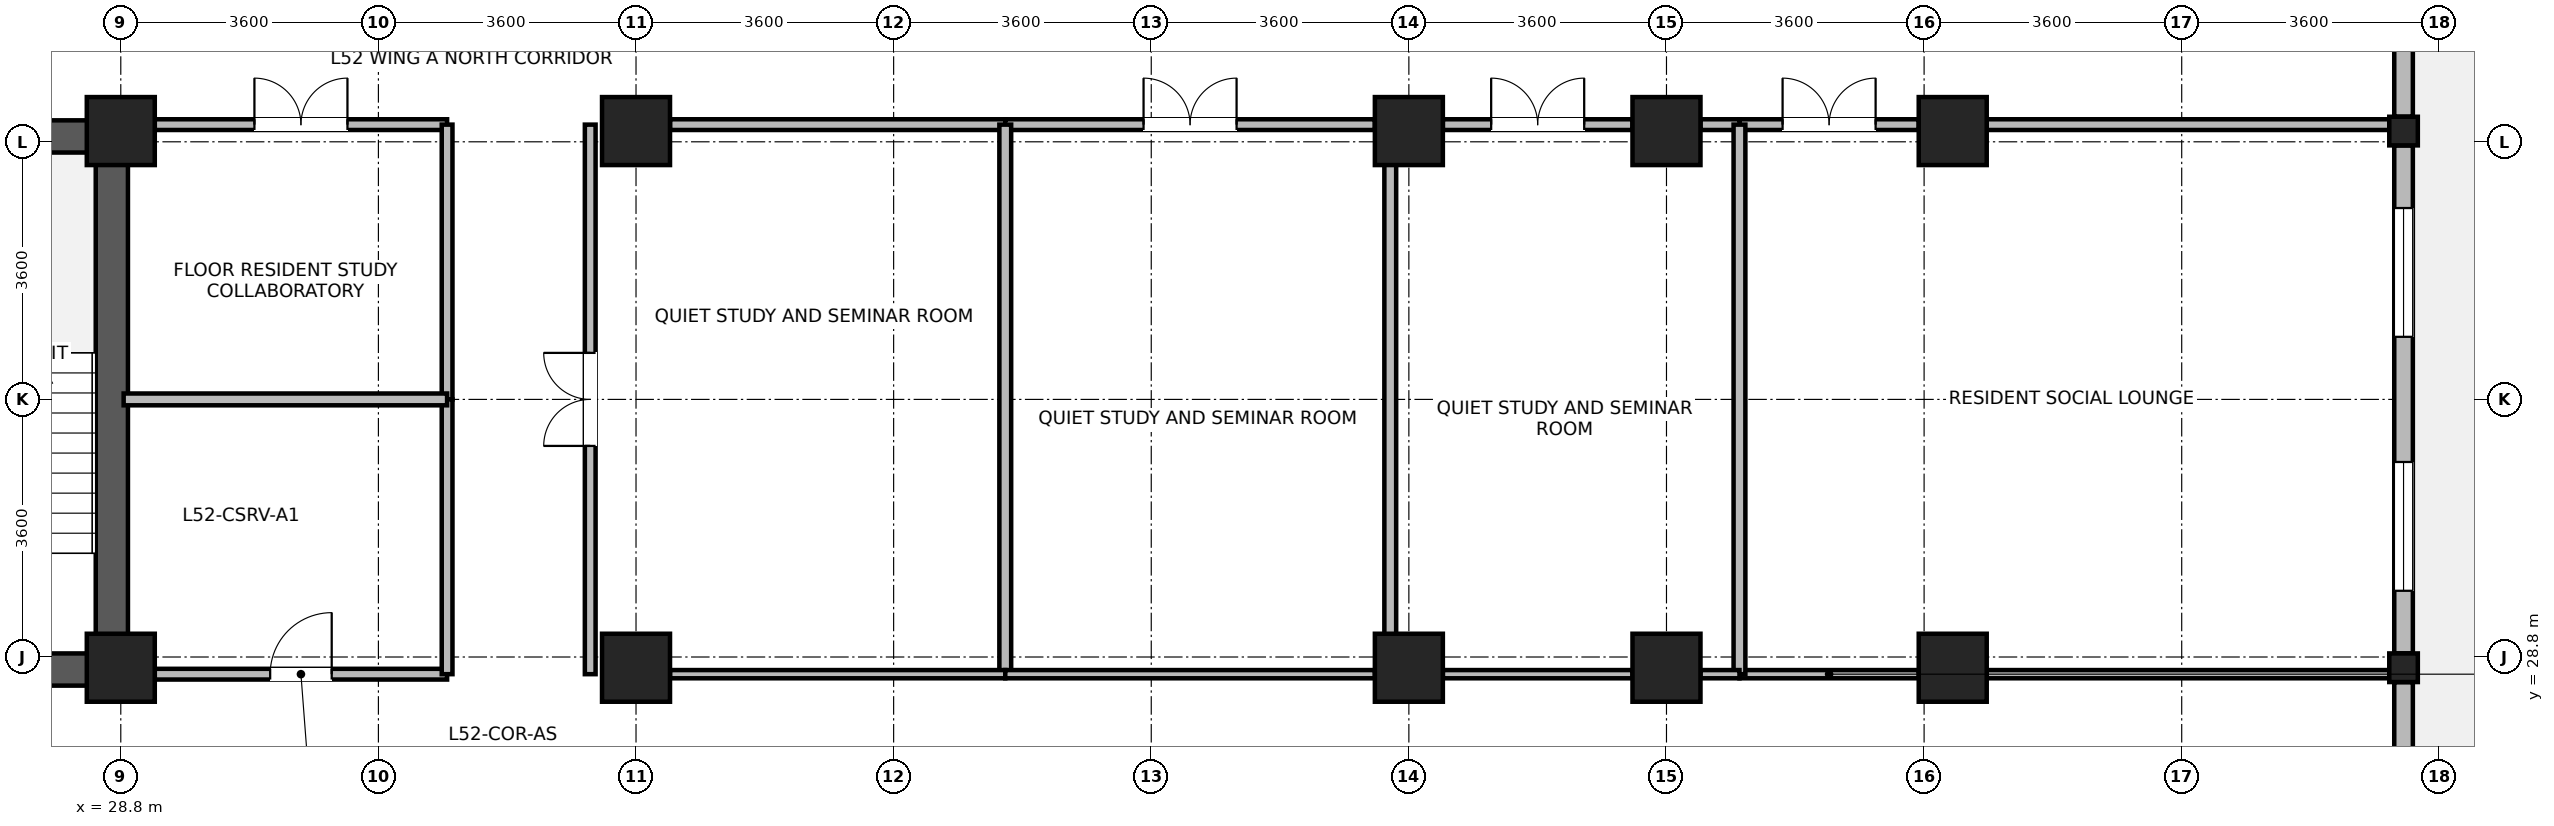
"""IFC4 building model, lengths in metres.
Left out: names, types, materials, properties, quantities, classifications, styles, units other than length and angle.
Written with IfcOpenShell. Run it as: python <this file> out.ifc"""

import sys

from ifc_helpers import new_model, si_unit, direction, frame, frame_2d, origin, origin_2d, place, context, subcontext, project, spatial, rectangle, i_section, extrude, source, transform, mapped, element, fill, save


model = new_model("IFC4")
c1 = context("Model", 3, precision=1e-05, world=origin(), true_north=direction((0.0, 1.0)))
c2 = subcontext(c1, "Body", "Model", "MODEL_VIEW")
j1 = project(units=[si_unit("LENGTHUNIT", "METRE"), si_unit("PLANEANGLEUNIT", "RADIAN")], contexts=[c1])
p1 = place(None, origin())
s1 = spatial("IfcSite", under=j1, at=p1, CompositionType="ELEMENT")
p2 = place(p1, origin())
s2 = spatial("IfcBuilding", under=s1, at=p2, CompositionType="ELEMENT")
p3 = place(p2, frame((0.0, 0.0, 205.5)))
s3 = spatial("IfcBuildingStorey", under=s2, at=p3, CompositionType="ELEMENT", Elevation=205.5)
p4 = place(p3, frame((28.675, 28.4, 0.0), z_axis=(0.0, 0.0, 1.0), x_axis=(0.0, 1.0, 0.0)))
e1 = element("IfcWall", 1, at=p4, inside=s3, PredefinedType="SHEAR", context=c2, shape_type="SweptSolid", body=[
    extrude(rectangle(XDim=7.9, YDim=0.45, at=frame_2d((3.95, 0.0))), origin(), (0.0, 0.0, 1.0), 3.47),
])
for number, where, z_axis, x_axis in (
    (2, (25.25, 28.625, 0.0), (0.0, 0.0, 1.0), (1.0, 0.0, 0.0)),
    (3, (25.25, 36.075, 0.0), (0.0, 0.0, 1.0), (1.0, 0.0, 0.0)),
):
    element("IfcWall", number, at=place(p3, frame(where, z_axis=z_axis, x_axis=x_axis)), inside=s3, PredefinedType="SHEAR", context=c2, shape_type="SweptSolid", body=[
        extrude(rectangle(XDim=3.2, YDim=0.45, at=frame_2d((1.6, 0.0))), origin(), (0.0, 0.0, 1.0), 3.47),
    ])
m1 = source(origin(), c2, "Body", "SweptSolid", [
    extrude(rectangle(XDim=0.95, YDim=0.95, at=origin_2d()), origin(), (0.0, 0.0, 1.0), 3.7),
])
for number, where, z_axis, x_axis in (
    (4, (28.8, 28.65, 0.0), (0.0, 0.0, 1.0), (1.0, 0.0, 0.0)),
    (5, (28.8, 36.15, 0.0), (0.0, 0.0, 1.0), (1.0, 0.0, 0.0)),
    (6, (36.0, 28.65, 0.0), (0.0, 0.0, 1.0), (1.0, 0.0, 0.0)),
    (7, (36.0, 36.15, 0.0), (0.0, 0.0, 1.0), (1.0, 0.0, 0.0)),
    (8, (46.8, 28.65, 0.0), (0.0, 0.0, 1.0), (1.0, 0.0, 0.0)),
    (9, (46.8, 36.15, 0.0), (0.0, 0.0, 1.0), (1.0, 0.0, 0.0)),
    (10, (50.4, 28.65, 0.0), (0.0, 0.0, 1.0), (1.0, 0.0, 0.0)),
    (11, (50.4, 36.15, 0.0), (0.0, 0.0, 1.0), (1.0, 0.0, 0.0)),
    (12, (54.4, 28.65, 0.0), (0.0, 0.0, 1.0), (1.0, 0.0, 0.0)),
    (13, (54.4, 36.15, 0.0), (0.0, 0.0, 1.0), (1.0, 0.0, 0.0)),
):
    element("IfcColumn", number, at=place(p3, frame(where, z_axis=z_axis, x_axis=x_axis)), inside=s3, PredefinedType="COLUMN", context=c2, shape_type="MappedRepresentation", body=[
        mapped(m1, transform((0.0, 0.0, 0.0), x_axis=(1.0, 0.0, 0.0), y_axis=(0.0, 1.0, 0.0), z_axis=(0.0, 0.0, 1.0), scale=1.0)),
    ])
m2 = source(origin(), c2, "Body", "SweptSolid", [
    extrude(i_section(OverallWidth=0.399, OverallDepth=0.4, WebThickness=0.017, FlangeThickness=0.023, FilletRadius=0.015, at=origin_2d()), origin(), (0.0, 0.0, 1.0), 3.7),
])
for number, where, z_axis, x_axis in (
    (14, (60.7, 28.65, 0.0), (0.0, 0.0, 1.0), (1.0, 0.0, 0.0)),
    (15, (60.7, 36.15, 0.0), (0.0, 0.0, 1.0), (1.0, 0.0, 0.0)),
):
    element("IfcColumn", number, at=place(p3, frame(where, z_axis=z_axis, x_axis=x_axis)), inside=s3, PredefinedType="COLUMN", context=c2, shape_type="MappedRepresentation", body=[
        mapped(m2, transform((0.0, 0.0, 0.0), x_axis=(1.0, 0.0, 0.0), y_axis=(0.0, 1.0, 0.0), z_axis=(0.0, 0.0, 1.0), scale=1.0)),
    ])
p5 = place(p3, frame((60.7, 28.449, 0.0), z_axis=(0.0, 0.0, 1.0), x_axis=(0.0, -1.0, 0.0)))
e16 = element("IfcWall", 16, at=p5, inside=s3, PredefinedType="STANDARD", context=c2, shape_type="SweptSolid", body=[
    extrude(rectangle(XDim=6.648, YDim=0.26, at=frame_2d((3.324, 0.0))), origin(), (0.0, 0.0, 1.0), 3.0),
])
p6 = place(p5, frame((4.086, 0.0, 0.85)))
e17 = element("IfcOpeningElement", 17, at=p6, cuts=e16, PredefinedType="OPENING", context=c2, shape_type="SweptSolid", body=[
    extrude(rectangle(XDim=1.8, YDim=1.85, at=frame_2d((0.9, 0.925))), frame((0.0, 0.14, 0.0), z_axis=(0.0, -1.0, 0.0), x_axis=(1.0, 0.0, 0.0)), (0.0, 0.0, 1.0), 0.28),
])
p7 = place(p5, frame((2.317, 0.0, 0.85)))
e18 = element("IfcOpeningElement", 18, at=p7, cuts=e16, PredefinedType="OPENING", context=c2, shape_type="SweptSolid", body=[
    extrude(rectangle(XDim=0.95, YDim=1.75, at=frame_2d((0.475, 0.875))), frame((0.0, 0.14, 0.0), z_axis=(0.0, -1.0, 0.0), x_axis=(1.0, 0.0, 0.0)), (0.0, 0.0, 1.0), 0.28),
])
p8 = place(p3, frame((60.7, 35.949, 0.0), z_axis=(0.0, 0.0, 1.0), x_axis=(0.0, -1.0, 0.0)))
e19 = element("IfcWall", 19, at=p8, inside=s3, PredefinedType="STANDARD", context=c2, shape_type="SweptSolid", body=[
    extrude(rectangle(XDim=7.098, YDim=0.26, at=frame_2d((3.549, 0.0))), origin(), (0.0, 0.0, 1.0), 3.0),
])
p9 = place(p8, frame((0.875, 0.0, 0.85)))
e20 = element("IfcOpeningElement", 20, at=p9, cuts=e19, PredefinedType="OPENING", context=c2, shape_type="SweptSolid", body=[
    extrude(rectangle(XDim=1.8, YDim=1.85, at=frame_2d((0.9, 0.925))), frame((0.0, 0.14, 0.0), z_axis=(0.0, -1.0, 0.0), x_axis=(1.0, 0.0, 0.0)), (0.0, 0.0, 1.0), 0.28),
])
p10 = place(p8, frame((4.424, 0.0, 0.85)))
e21 = element("IfcOpeningElement", 21, at=p10, cuts=e19, PredefinedType="OPENING", context=c2, shape_type="SweptSolid", body=[
    extrude(rectangle(XDim=1.8, YDim=1.85, at=frame_2d((0.9, 0.925))), frame((0.0, 0.14, 0.0), z_axis=(0.0, -1.0, 0.0), x_axis=(1.0, 0.0, 0.0)), (0.0, 0.0, 1.0), 0.28),
])
p11 = place(p3, frame((60.7, 43.33, 0.0), z_axis=(0.0, 0.0, 1.0), x_axis=(0.0, -1.0, 0.0)))
e22 = element("IfcWall", 22, at=p11, inside=s3, PredefinedType="STANDARD", context=c2, shape_type="SweptSolid", body=[
    extrude(rectangle(XDim=6.979, YDim=0.26, at=frame_2d((3.49, 0.0))), origin(), (0.0, 0.0, 1.0), 3.45),
])
p12 = place(p11, frame((0.845, 0.0, 0.85)))
e23 = element("IfcOpeningElement", 23, at=p12, cuts=e22, PredefinedType="OPENING", context=c2, shape_type="SweptSolid", body=[
    extrude(rectangle(XDim=1.8, YDim=1.85, at=frame_2d((0.9, 0.925))), frame((0.0, 0.14, 0.0), z_axis=(0.0, -1.0, 0.0), x_axis=(1.0, 0.0, 0.0)), (0.0, 0.0, 1.0), 0.28),
])
p13 = place(p11, frame((3.014, 0.0, 0.85)))
e24 = element("IfcOpeningElement", 24, at=p13, cuts=e22, PredefinedType="OPENING", context=c2, shape_type="SweptSolid", body=[
    extrude(rectangle(XDim=0.95, YDim=1.75, at=frame_2d((0.475, 0.875))), frame((0.0, 0.14, 0.0), z_axis=(0.0, -1.0, 0.0), x_axis=(1.0, 0.0, 0.0)), (0.0, 0.0, 1.0), 0.28),
])
p14 = place(p3, frame((51.42, 36.24, 0.0), z_axis=(0.0, 0.0, 1.0), x_axis=(1.0, 0.0, 0.0)))
e25 = element("IfcWall", 25, at=p14, inside=s3, PredefinedType="PARTITIONING", context=c2, shape_type="SweptSolid", body=[
    extrude(rectangle(XDim=2.505, YDim=0.15, at=frame_2d((1.252, 0.0))), origin(), (0.0, 0.0, 1.0), 2.85),
])
p15 = place(p14, frame((0.603, 0.0, 0.0)))
e26 = element("IfcOpeningElement", 26, at=p15, cuts=e25, PredefinedType="OPENING", context=c2, shape_type="SweptSolid", body=[
    extrude(rectangle(XDim=1.3, YDim=2.12, at=frame_2d((0.65, 1.06))), frame((0.0, 0.085, 0.0), z_axis=(0.0, -1.0, 0.0), x_axis=(1.0, 0.0, 0.0)), (0.0, 0.0, 1.0), 0.17),
])
p16 = place(p3, frame((54.875, 36.24, 0.0), z_axis=(0.0, 0.0, 1.0), x_axis=(1.0, 0.0, 0.0)))
e27 = element("IfcWall", 27, at=p16, inside=s3, PredefinedType="PARTITIONING", context=c2, shape_type="SweptSolid", body=[
    extrude(rectangle(XDim=5.625, YDim=0.15, at=frame_2d((2.813, 0.0))), origin(), (0.0, 0.0, 1.0), 2.85),
])
p17 = place(p3, frame((35.36, 28.56, 0.0), z_axis=(0.0, 0.0, 1.0), x_axis=(0.0, 1.0, 0.0)))
e28 = element("IfcWall", 28, at=p17, inside=s3, PredefinedType="PARTITIONING", context=c2, shape_type="SweptSolid", body=[
    extrude(rectangle(XDim=7.68, YDim=0.15, at=frame_2d((3.84, 0.0))), origin(), (0.0, 0.0, 1.0), 3.45),
])
p18 = place(p17, frame((3.19, 0.0, 0.0)))
e29 = element("IfcOpeningElement", 29, at=p18, cuts=e28, PredefinedType="OPENING", context=c2, shape_type="SweptSolid", body=[
    extrude(rectangle(XDim=1.3, YDim=2.12, at=frame_2d((0.65, 1.06))), frame((0.0, 0.085, 0.0), z_axis=(0.0, -1.0, 0.0), x_axis=(1.0, 0.0, 0.0)), (0.0, 0.0, 1.0), 0.17),
])
p19 = place(p3, frame((36.475, 36.24, 0.0), z_axis=(0.0, 0.0, 1.0), x_axis=(1.0, 0.0, 0.0)))
e30 = element("IfcWall", 30, at=p19, inside=s3, PredefinedType="PARTITIONING", context=c2, shape_type="SweptSolid", body=[
    extrude(rectangle(XDim=4.685, YDim=0.15, at=frame_2d((2.342, 0.0))), origin(), (0.0, 0.0, 1.0), 2.85),
])
p20 = place(p3, frame((41.16, 36.24, 0.0), z_axis=(0.0, 0.0, 1.0), x_axis=(1.0, 0.0, 0.0)))
e31 = element("IfcWall", 31, at=p20, inside=s3, PredefinedType="PARTITIONING", context=c2, shape_type="SweptSolid", body=[
    extrude(rectangle(XDim=5.165, YDim=0.15, at=frame_2d((2.583, 0.0))), origin(), (0.0, 0.0, 1.0), 2.85),
])
p21 = place(p20, frame((1.933, 0.0, 0.0)))
e32 = element("IfcOpeningElement", 32, at=p21, cuts=e31, PredefinedType="OPENING", context=c2, shape_type="SweptSolid", body=[
    extrude(rectangle(XDim=1.3, YDim=2.12, at=frame_2d((0.65, 1.06))), frame((0.0, 0.085, 0.0), z_axis=(0.0, -1.0, 0.0), x_axis=(1.0, 0.0, 0.0)), (0.0, 0.0, 1.0), 0.17),
])
p22 = place(p3, frame((47.275, 36.24, 0.0), z_axis=(0.0, 0.0, 1.0), x_axis=(1.0, 0.0, 0.0)))
e33 = element("IfcWall", 33, at=p22, inside=s3, PredefinedType="PARTITIONING", context=c2, shape_type="SweptSolid", body=[
    extrude(rectangle(XDim=2.65, YDim=0.15, at=frame_2d((1.325, 0.0))), origin(), (0.0, 0.0, 1.0), 2.85),
])
p23 = place(p22, frame((0.675, 0.0, 0.0)))
e34 = element("IfcOpeningElement", 34, at=p23, cuts=e33, PredefinedType="OPENING", context=c2, shape_type="SweptSolid", body=[
    extrude(rectangle(XDim=1.3, YDim=2.12, at=frame_2d((0.65, 1.06))), frame((0.0, 0.085, 0.0), z_axis=(0.0, -1.0, 0.0), x_axis=(1.0, 0.0, 0.0)), (0.0, 0.0, 1.0), 0.17),
])
p24 = place(p3, frame((50.875, 36.24, 0.0), z_axis=(0.0, 0.0, 1.0), x_axis=(1.0, 0.0, 0.0)))
e35 = element("IfcWall", 35, at=p24, inside=s3, PredefinedType="PARTITIONING", context=c2, shape_type="SweptSolid", body=[
    extrude(rectangle(XDim=0.545, YDim=0.15, at=frame_2d((0.272, 0.0))), origin(), (0.0, 0.0, 1.0), 2.85),
])
p25 = place(p3, frame((29.275, 28.56, 0.0), z_axis=(0.0, 0.0, 1.0), x_axis=(1.0, 0.0, 0.0)))
e36 = element("IfcWall", 36, at=p25, inside=s3, PredefinedType="PARTITIONING", context=c2, shape_type="SweptSolid", body=[
    extrude(rectangle(XDim=4.085, YDim=0.15, at=frame_2d((2.042, 0.0))), origin(), (0.0, 0.0, 1.0), 2.85),
])
p26 = place(p25, frame((1.613, 0.0, 0.0)))
e37 = element("IfcOpeningElement", 37, at=p26, cuts=e36, PredefinedType="OPENING", context=c2, shape_type="SweptSolid", body=[
    extrude(rectangle(XDim=0.86, YDim=2.02, at=frame_2d((0.43, 1.01))), frame((0.0, 0.085, 0.0), z_axis=(0.0, -1.0, 0.0), x_axis=(1.0, 0.0, 0.0)), (0.0, 0.0, 1.0), 0.17),
])
p27 = place(p3, frame((29.275, 36.24, 0.0), z_axis=(0.0, 0.0, 1.0), x_axis=(1.0, 0.0, 0.0)))
e38 = element("IfcWall", 38, at=p27, inside=s3, PredefinedType="PARTITIONING", context=c2, shape_type="SweptSolid", body=[
    extrude(rectangle(XDim=4.085, YDim=0.15, at=frame_2d((2.042, 0.0))), origin(), (0.0, 0.0, 1.0), 2.85),
])
p28 = place(p27, frame((1.393, 0.0, 0.0)))
e39 = element("IfcOpeningElement", 39, at=p28, cuts=e38, PredefinedType="OPENING", context=c2, shape_type="SweptSolid", body=[
    extrude(rectangle(XDim=1.3, YDim=2.12, at=frame_2d((0.65, 1.06))), frame((0.0, 0.085, 0.0), z_axis=(0.0, -1.0, 0.0), x_axis=(1.0, 0.0, 0.0)), (0.0, 0.0, 1.0), 0.17),
])
p29 = place(p3, frame((33.36, 32.4, 0.0), z_axis=(0.0, 0.0, 1.0), x_axis=(0.0, 1.0, 0.0)))
e40 = element("IfcWall", 40, at=p29, inside=s3, PredefinedType="PARTITIONING", context=c2, shape_type="SweptSolid", body=[
    extrude(rectangle(XDim=3.84, YDim=0.15, at=frame_2d((1.92, 0.0))), origin(), (0.0, 0.0, 1.0), 3.45),
])
p30 = place(p3, frame((33.36, 28.56, 0.0), z_axis=(0.0, 0.0, 1.0), x_axis=(0.0, 1.0, 0.0)))
e41 = element("IfcWall", 41, at=p30, inside=s3, PredefinedType="PARTITIONING", context=c2, shape_type="SweptSolid", body=[
    extrude(rectangle(XDim=3.84, YDim=0.15, at=frame_2d((1.92, 0.0))), origin(), (0.0, 0.0, 1.0), 3.45),
])
p31 = place(p3, frame((51.42, 28.56, 0.0), z_axis=(0.0, 0.0, 1.0), x_axis=(1.0, 0.0, 0.0)))
e42 = element("IfcWall", 42, at=p31, inside=s3, PredefinedType="PARTITIONING", context=c2, shape_type="SweptSolid", body=[
    extrude(rectangle(XDim=2.505, YDim=0.115, at=frame_2d((1.252, 0.0))), origin(), (0.0, 0.0, 1.0), 2.85),
])
p32 = place(p3, frame((54.875, 28.56, 0.0), z_axis=(0.0, 0.0, 1.0), x_axis=(1.0, 0.0, 0.0)))
e43 = element("IfcWall", 43, at=p32, inside=s3, PredefinedType="PARTITIONING", context=c2, shape_type="SweptSolid", body=[
    extrude(rectangle(XDim=5.625, YDim=0.115, at=frame_2d((2.813, 0.0))), origin(), (0.0, 0.0, 1.0), 2.85),
])
for number, where, z_axis, x_axis in (
    (44, (41.16, 28.56, 0.0), (0.0, 0.0, 1.0), (0.0, 1.0, 0.0)),
    (45, (46.54, 28.56, 0.0), (0.0, 0.0, 1.0), (0.0, 1.0, 0.0)),
    (46, (51.42, 28.56, 0.0), (0.0, 0.0, 1.0), (0.0, 1.0, 0.0)),
):
    element("IfcWall", number, at=place(p3, frame(where, z_axis=z_axis, x_axis=x_axis)), inside=s3, PredefinedType="PARTITIONING", context=c2, shape_type="SweptSolid", body=[
        extrude(rectangle(XDim=7.68, YDim=0.165, at=frame_2d((3.84, 0.0))), origin(), (0.0, 0.0, 1.0), 3.45),
    ])
p33 = place(p3, frame((36.475, 28.56, 0.0), z_axis=(0.0, 0.0, 1.0), x_axis=(1.0, 0.0, 0.0)))
e47 = element("IfcWall", 47, at=p33, inside=s3, PredefinedType="PARTITIONING", context=c2, shape_type="SweptSolid", body=[
    extrude(rectangle(XDim=4.685, YDim=0.115, at=frame_2d((2.342, 0.0))), origin(), (0.0, 0.0, 1.0), 2.85),
])
p34 = place(p3, frame((41.16, 28.56, 0.0), z_axis=(0.0, 0.0, 1.0), x_axis=(1.0, 0.0, 0.0)))
e48 = element("IfcWall", 48, at=p34, inside=s3, PredefinedType="PARTITIONING", context=c2, shape_type="SweptSolid", body=[
    extrude(rectangle(XDim=5.165, YDim=0.115, at=frame_2d((2.583, 0.0))), origin(), (0.0, 0.0, 1.0), 2.85),
])
p35 = place(p3, frame((47.275, 28.56, 0.0), z_axis=(0.0, 0.0, 1.0), x_axis=(1.0, 0.0, 0.0)))
e49 = element("IfcWall", 49, at=p35, inside=s3, PredefinedType="PARTITIONING", context=c2, shape_type="SweptSolid", body=[
    extrude(rectangle(XDim=2.65, YDim=0.115, at=frame_2d((1.325, 0.0))), origin(), (0.0, 0.0, 1.0), 2.85),
])
p36 = place(p3, frame((50.875, 28.56, 0.0), z_axis=(0.0, 0.0, 1.0), x_axis=(1.0, 0.0, 0.0)))
e50 = element("IfcWall", 50, at=p36, inside=s3, PredefinedType="PARTITIONING", context=c2, shape_type="SweptSolid", body=[
    extrude(rectangle(XDim=0.545, YDim=0.115, at=frame_2d((0.272, 0.0))), origin(), (0.0, 0.0, 1.0), 2.85),
])
p37 = place(p3, frame((28.84, 32.4, 0.0), z_axis=(0.0, 0.0, 1.0), x_axis=(1.0, 0.0, 0.0)))
e51 = element("IfcWall", 51, at=p37, inside=s3, PredefinedType="PARTITIONING", context=c2, shape_type="SweptSolid", body=[
    extrude(rectangle(XDim=4.52, YDim=0.165, at=frame_2d((2.26, 0.0))), origin(), (0.0, 0.0, 1.0), 3.45),
])
p38 = place(p9, origin())
e52 = element("IfcWindow", 52, at=p38, inside=s3, PartitioningType="SINGLE_PANEL", PredefinedType="WINDOW", context=c2, shape_type="SweptSolid", body=[
    extrude(rectangle(XDim=1.8, YDim=1.85, at=frame_2d((0.9, 0.925))), frame((0.0, 0.03, 0.0), z_axis=(0.0, -1.0, 0.0), x_axis=(1.0, 0.0, 0.0)), (0.0, 0.0, 1.0), 0.06),
])
fill(e20, e52)
p39 = place(p10, origin())
e53 = element("IfcWindow", 53, at=p39, inside=s3, PartitioningType="SINGLE_PANEL", PredefinedType="WINDOW", context=c2, shape_type="SweptSolid", body=[
    extrude(rectangle(XDim=1.8, YDim=1.85, at=frame_2d((0.9, 0.925))), frame((0.0, 0.03, 0.0), z_axis=(0.0, -1.0, 0.0), x_axis=(1.0, 0.0, 0.0)), (0.0, 0.0, 1.0), 0.06),
])
fill(e21, e53)
p40 = place(p15, origin())
e54 = element("IfcDoor", 54, at=p40, inside=s3, OperationType="DOUBLE_DOOR_SINGLE_SWING", PredefinedType="DOOR", context=c2, shape_type="SweptSolid", body=[
    extrude(rectangle(XDim=1.3, YDim=2.12, at=frame_2d((0.65, 1.06))), frame((0.0, 0.025, 0.0), z_axis=(0.0, -1.0, 0.0), x_axis=(1.0, 0.0, 0.0)), (0.0, 0.0, 1.0), 0.05),
])
fill(e26, e54)
p41 = place(p18, origin())
e55 = element("IfcDoor", 55, at=p41, inside=s3, OperationType="DOUBLE_DOOR_SINGLE_SWING", PredefinedType="DOOR", context=c2, shape_type="SweptSolid", body=[
    extrude(rectangle(XDim=1.3, YDim=2.12, at=frame_2d((0.65, 1.06))), frame((0.0, 0.025, 0.0), z_axis=(0.0, -1.0, 0.0), x_axis=(1.0, 0.0, 0.0)), (0.0, 0.0, 1.0), 0.05),
])
fill(e29, e55)
p42 = place(p21, origin())
e56 = element("IfcDoor", 56, at=p42, inside=s3, OperationType="DOUBLE_DOOR_SINGLE_SWING", PredefinedType="DOOR", context=c2, shape_type="SweptSolid", body=[
    extrude(rectangle(XDim=1.3, YDim=2.12, at=frame_2d((0.65, 1.06))), frame((0.0, 0.025, 0.0), z_axis=(0.0, -1.0, 0.0), x_axis=(1.0, 0.0, 0.0)), (0.0, 0.0, 1.0), 0.05),
])
fill(e32, e56)
p43 = place(p23, origin())
e57 = element("IfcDoor", 57, at=p43, inside=s3, OperationType="DOUBLE_DOOR_SINGLE_SWING", PredefinedType="DOOR", context=c2, shape_type="SweptSolid", body=[
    extrude(rectangle(XDim=1.3, YDim=2.12, at=frame_2d((0.65, 1.06))), frame((0.0, 0.025, 0.0), z_axis=(0.0, -1.0, 0.0), x_axis=(1.0, 0.0, 0.0)), (0.0, 0.0, 1.0), 0.05),
])
fill(e34, e57)
p44 = place(p26, origin())
e58 = element("IfcDoor", 58, at=p44, inside=s3, OperationType="SINGLE_SWING_RIGHT", PredefinedType="DOOR", context=c2, shape_type="SweptSolid", body=[
    extrude(rectangle(XDim=0.86, YDim=2.02, at=frame_2d((0.43, 1.01))), frame((0.0, 0.025, 0.0), z_axis=(0.0, -1.0, 0.0), x_axis=(1.0, 0.0, 0.0)), (0.0, 0.0, 1.0), 0.05),
])
fill(e37, e58)
p45 = place(p28, origin())
e59 = element("IfcDoor", 59, at=p45, inside=s3, OperationType="DOUBLE_DOOR_SINGLE_SWING", PredefinedType="DOOR", context=c2, shape_type="SweptSolid", body=[
    extrude(rectangle(XDim=1.3, YDim=2.12, at=frame_2d((0.65, 1.06))), frame((0.0, 0.025, 0.0), z_axis=(0.0, -1.0, 0.0), x_axis=(1.0, 0.0, 0.0)), (0.0, 0.0, 1.0), 0.05),
])
fill(e39, e59)
save(model, sys.argv[1])
